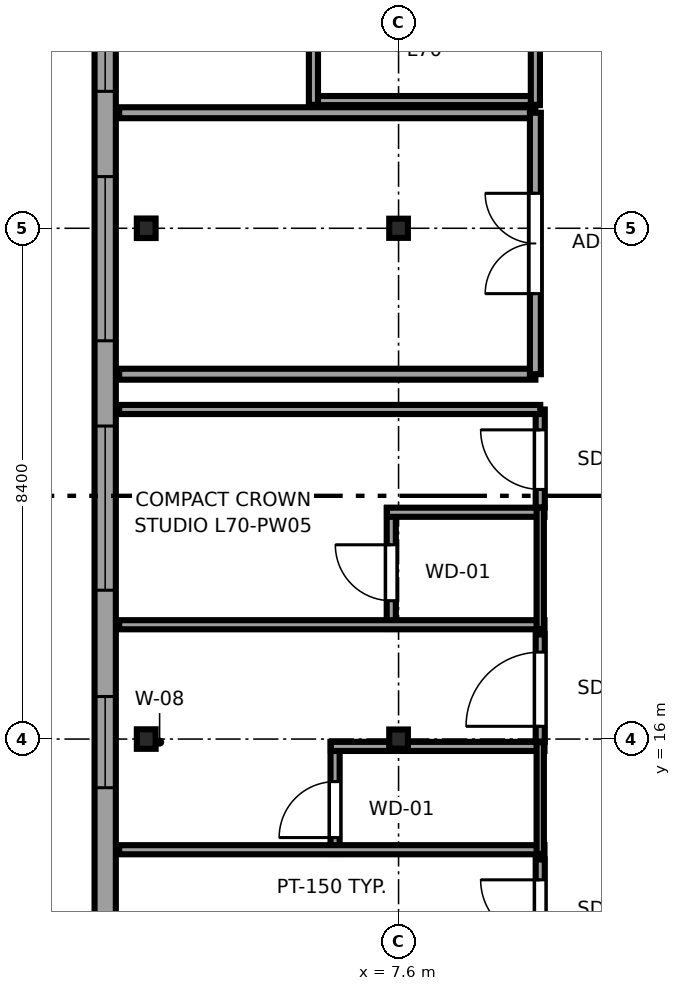
"""IFC4 building model, lengths in metres.
Left out: names, types, materials, properties, quantities, classifications, styles, units other than length and angle.
Written with IfcOpenShell. Run it as: python <this file> out.ifc"""

import sys

from ifc_helpers import new_model, si_unit, direction, frame, frame_2d, origin, origin_2d, place, context, subcontext, project, spatial, rectangle, i_section, extrude, source, transform, mapped, element, fill, save


model = new_model("IFC4")
c1 = context("Model", 3, precision=1e-05, world=origin(), true_north=direction((0.0, 1.0)))
c2 = subcontext(c1, "Body", "Model", "MODEL_VIEW")
j1 = project(units=[si_unit("LENGTHUNIT", "METRE"), si_unit("PLANEANGLEUNIT", "RADIAN")], contexts=[c1])
p1 = place(None, origin())
s1 = spatial("IfcSite", under=j1, at=p1, CompositionType="ELEMENT")
p2 = place(p1, origin())
s2 = spatial("IfcBuilding", under=s1, at=p2, CompositionType="ELEMENT")
p3 = place(p2, frame((0.0, 0.0, 262.95)))
s3 = spatial("IfcBuildingStorey", under=s2, at=p3, CompositionType="ELEMENT", Elevation=262.95)
m1 = source(origin(), c2, "Body", "SweptSolid", [
    extrude(i_section(OverallWidth=0.309, OverallDepth=0.321, WebThickness=0.014, FlangeThickness=0.022, FilletRadius=0.017, at=origin_2d()), origin(), (0.0, 0.0, 1.0), 3.55),
])
p4 = place(p3, frame((3.45, 16.0, 0.0), z_axis=(0.0, 0.0, 1.0), x_axis=(1.0, 0.0, 0.0)))
e1 = element("IfcColumn", 1, at=p4, inside=s3, PredefinedType="COLUMN", context=c2, shape_type="MappedRepresentation", body=[
    mapped(m1, transform((0.0, 0.0, 0.0), x_axis=(1.0, 0.0, 0.0), y_axis=(0.0, 1.0, 0.0), z_axis=(0.0, 0.0, 1.0), scale=1.0)),
])
m2 = source(origin(), c2, "Body", "SweptSolid", [
    extrude(i_section(OverallWidth=0.307, OverallDepth=0.315, WebThickness=0.012, FlangeThickness=0.019, FilletRadius=0.017, at=origin_2d()), origin(), (0.0, 0.0, 1.0), 3.55),
])
p5 = place(p3, frame((7.6, 16.0, 0.0), z_axis=(0.0, 0.0, 1.0), x_axis=(1.0, 0.0, 0.0)))
e2 = element("IfcColumn", 2, at=p5, inside=s3, PredefinedType="COLUMN", context=c2, shape_type="MappedRepresentation", body=[
    mapped(m2, transform((0.0, 0.0, 0.0), x_axis=(1.0, 0.0, 0.0), y_axis=(0.0, 1.0, 0.0), z_axis=(0.0, 0.0, 1.0), scale=1.0)),
])
p6 = place(p3, frame((3.45, 24.4, 0.0), z_axis=(0.0, 0.0, 1.0), x_axis=(1.0, 0.0, 0.0)))
e3 = element("IfcColumn", 3, at=p6, inside=s3, PredefinedType="COLUMN", context=c2, shape_type="MappedRepresentation", body=[
    mapped(m1, transform((0.0, 0.0, 0.0), x_axis=(1.0, 0.0, 0.0), y_axis=(0.0, 1.0, 0.0), z_axis=(0.0, 0.0, 1.0), scale=1.0)),
])
p7 = place(p3, frame((7.6, 24.4, 0.0), z_axis=(0.0, 0.0, 1.0), x_axis=(1.0, 0.0, 0.0)))
e4 = element("IfcColumn", 4, at=p7, inside=s3, PredefinedType="COLUMN", context=c2, shape_type="MappedRepresentation", body=[
    mapped(m2, transform((0.0, 0.0, 0.0), x_axis=(1.0, 0.0, 0.0), y_axis=(0.0, 1.0, 0.0), z_axis=(0.0, 0.0, 1.0), scale=1.0)),
])
p8 = place(p3, frame((2.775, 40.783, 0.0), z_axis=(0.0, 0.0, 1.0), x_axis=(0.0, -1.0, 0.0)))
e5 = element("IfcWall", 5, at=p8, inside=s3, PredefinedType="SOLIDWALL", context=c2, shape_type="SweptSolid", body=[
    extrude(rectangle(XDim=33.766, YDim=0.35, at=frame_2d((16.883, 0.0))), origin(), (0.0, 0.0, 1.0), 3.37),
])
p9 = place(p8, frame((5.678, 0.0, 0.68)))
e6 = element("IfcOpeningElement", 6, at=p9, cuts=e5, PredefinedType="OPENING", context=c2, shape_type="SweptSolid", body=[
    extrude(rectangle(XDim=2.7, YDim=1.95, at=frame_2d((1.35, 0.975))), frame((0.0, 0.185, 0.0), z_axis=(0.0, -1.0, 0.0), x_axis=(1.0, 0.0, 0.0)), (0.0, 0.0, 1.0), 0.37),
])
p10 = place(p8, frame((11.431, 0.0, 0.68)))
e7 = element("IfcOpeningElement", 7, at=p10, cuts=e5, PredefinedType="OPENING", context=c2, shape_type="SweptSolid", body=[
    extrude(rectangle(XDim=2.7, YDim=1.95, at=frame_2d((1.35, 0.975))), frame((0.0, 0.185, 0.0), z_axis=(0.0, -1.0, 0.0), x_axis=(1.0, 0.0, 0.0)), (0.0, 0.0, 1.0), 0.37),
])
p11 = place(p8, frame((15.533, 0.0, 0.68)))
e8 = element("IfcOpeningElement", 8, at=p11, cuts=e5, PredefinedType="OPENING", context=c2, shape_type="SweptSolid", body=[
    extrude(rectangle(XDim=2.7, YDim=1.95, at=frame_2d((1.35, 0.975))), frame((0.0, 0.185, 0.0), z_axis=(0.0, -1.0, 0.0), x_axis=(1.0, 0.0, 0.0)), (0.0, 0.0, 1.0), 0.37),
])
p12 = place(p8, frame((19.635, 0.0, 0.68)))
e9 = element("IfcOpeningElement", 9, at=p12, cuts=e5, PredefinedType="OPENING", context=c2, shape_type="SweptSolid", body=[
    extrude(rectangle(XDim=2.7, YDim=1.95, at=frame_2d((1.35, 0.975))), frame((0.0, 0.185, 0.0), z_axis=(0.0, -1.0, 0.0), x_axis=(1.0, 0.0, 0.0)), (0.0, 0.0, 1.0), 0.37),
])
p13 = place(p8, frame((31.279, 0.0, 0.62)))
e10 = element("IfcOpeningElement", 10, at=p13, cuts=e5, PredefinedType="OPENING", context=c2, shape_type="SweptSolid", body=[
    extrude(rectangle(XDim=1.5, YDim=1.55, at=frame_2d((0.75, 0.775))), frame((0.0, 0.185, 0.0), z_axis=(0.0, -1.0, 0.0), x_axis=(1.0, 0.0, 0.0)), (0.0, 0.0, 1.0), 0.37),
])
p14 = place(p8, frame((27.783, 0.0, 0.62)))
e11 = element("IfcOpeningElement", 11, at=p14, cuts=e5, PredefinedType="OPENING", context=c2, shape_type="SweptSolid", body=[
    extrude(rectangle(XDim=1.5, YDim=1.55, at=frame_2d((0.75, 0.775))), frame((0.0, 0.185, 0.0), z_axis=(0.0, -1.0, 0.0), x_axis=(1.0, 0.0, 0.0)), (0.0, 0.0, 1.0), 0.37),
])
p15 = place(p8, frame((24.083, 0.0, 0.62)))
e12 = element("IfcOpeningElement", 12, at=p15, cuts=e5, PredefinedType="OPENING", context=c2, shape_type="SweptSolid", body=[
    extrude(rectangle(XDim=1.5, YDim=1.55, at=frame_2d((0.75, 0.775))), frame((0.0, 0.185, 0.0), z_axis=(0.0, -1.0, 0.0), x_axis=(1.0, 0.0, 0.0)), (0.0, 0.0, 1.0), 0.37),
])
p16 = place(p8, frame((0.586, 0.0, 0.62)))
e13 = element("IfcOpeningElement", 13, at=p16, cuts=e5, PredefinedType="OPENING", context=c2, shape_type="SweptSolid", body=[
    extrude(rectangle(XDim=1.5, YDim=1.55, at=frame_2d((0.75, 0.775))), frame((0.0, 0.185, 0.0), z_axis=(0.0, -1.0, 0.0), x_axis=(1.0, 0.0, 0.0)), (0.0, 0.0, 1.0), 0.37),
])
p17 = place(p3, frame((6.556, 14.11, 0.0), z_axis=(0.0, 0.0, 1.0), x_axis=(0.0, 1.0, 0.0)))
e14 = element("IfcWall", 14, at=p17, inside=s3, PredefinedType="PARTITIONING", context=c2, shape_type="SweptSolid", body=[
    extrude(rectangle(XDim=1.839, YDim=0.15, at=frame_2d((0.919, 0.0))), origin(), (0.0, 0.0, 1.0), 3.37),
])
p18 = place(p17, frame((0.27, 0.0, 0.0)))
e15 = element("IfcOpeningElement", 15, at=p18, cuts=e14, PredefinedType="OPENING", context=c2, shape_type="SweptSolid", body=[
    extrude(rectangle(XDim=0.92, YDim=2.01, at=frame_2d((0.46, 1.005))), frame((0.0, 0.085, 0.0), z_axis=(0.0, -1.0, 0.0), x_axis=(1.0, 0.0, 0.0)), (0.0, 0.0, 1.0), 0.17),
])
p19 = place(p3, frame((3.005, 14.18, 0.0), z_axis=(0.0, 0.0, 1.0), x_axis=(1.0, 0.0, 0.0)))
e16 = element("IfcWall", 16, at=p19, inside=s3, PredefinedType="PARTITIONING", context=c2, shape_type="SweptSolid", body=[
    extrude(rectangle(XDim=6.995, YDim=0.15, at=frame_2d((3.498, 0.0))), origin(), (0.0, 0.0, 1.0), 3.37),
])
p20 = place(p3, frame((6.486, 15.879, 0.0), z_axis=(0.0, 0.0, 1.0), x_axis=(1.0, 0.0, 0.0)))
e17 = element("IfcWall", 17, at=p20, inside=s3, PredefinedType="PARTITIONING", context=c2, shape_type="SweptSolid", body=[
    extrude(rectangle(XDim=3.514, YDim=0.15, at=frame_2d((1.757, 0.0))), origin(), (0.0, 0.0, 1.0), 2.827),
])
p21 = place(p3, frame((9.93, 14.11, 0.0), z_axis=(0.0, 0.0, 1.0), x_axis=(0.0, 1.0, 0.0)))
e18 = element("IfcWall", 18, at=p21, inside=s3, PredefinedType="PLUMBINGWALL", context=c2, shape_type="SweptSolid", body=[
    extrude(rectangle(XDim=1.839, YDim=0.12, at=frame_2d((0.919, 0.0))), origin(), (0.0, 0.0, 1.0), 3.37),
])
p22 = place(p3, frame((7.48, 17.81, 0.0), z_axis=(0.0, 0.0, 1.0), x_axis=(0.0, 1.0, 0.0)))
e19 = element("IfcWall", 19, at=p22, inside=s3, PredefinedType="PARTITIONING", context=c2, shape_type="SweptSolid", body=[
    extrude(rectangle(XDim=1.99, YDim=0.15, at=frame_2d((0.995, 0.0))), origin(), (0.0, 0.0, 1.0), 2.827),
])
p23 = place(p22, frame((0.465, 0.0, 0.0)))
e20 = element("IfcOpeningElement", 20, at=p23, cuts=e19, PredefinedType="OPENING", context=c2, shape_type="SweptSolid", body=[
    extrude(rectangle(XDim=0.92, YDim=2.01, at=frame_2d((0.46, 1.005))), frame((0.0, 0.085, 0.0), z_axis=(0.0, -1.0, 0.0), x_axis=(1.0, 0.0, 0.0)), (0.0, 0.0, 1.0), 0.17),
])
p24 = place(p3, frame((3.005, 17.88, 0.0), z_axis=(0.0, 0.0, 1.0), x_axis=(1.0, 0.0, 0.0)))
e21 = element("IfcWall", 21, at=p24, inside=s3, PredefinedType="PARTITIONING", context=c2, shape_type="SweptSolid", body=[
    extrude(rectangle(XDim=6.995, YDim=0.15, at=frame_2d((3.498, 0.0))), origin(), (0.0, 0.0, 1.0), 3.37),
])
p25 = place(p3, frame((7.41, 19.73, 0.0), z_axis=(0.0, 0.0, 1.0), x_axis=(1.0, 0.0, 0.0)))
e22 = element("IfcWall", 22, at=p25, inside=s3, PredefinedType="PARTITIONING", context=c2, shape_type="SweptSolid", body=[
    extrude(rectangle(XDim=2.59, YDim=0.15, at=frame_2d((1.295, 0.0))), origin(), (0.0, 0.0, 1.0), 3.37),
])
p26 = place(p3, frame((9.93, 17.81, 0.0), z_axis=(0.0, 0.0, 1.0), x_axis=(0.0, 1.0, 0.0)))
e23 = element("IfcWall", 23, at=p26, inside=s3, PredefinedType="PLUMBINGWALL", context=c2, shape_type="SweptSolid", body=[
    extrude(rectangle(XDim=1.99, YDim=0.12, at=frame_2d((0.995, 0.0))), origin(), (0.0, 0.0, 1.0), 3.37),
])
p27 = place(p3, frame((9.93, 12.41, 0.0), z_axis=(0.0, 0.0, 1.0), x_axis=(0.0, 1.0, 0.0)))
e24 = element("IfcWall", 24, at=p27, inside=s3, PredefinedType="PARTITIONING", context=c2, shape_type="SweptSolid", body=[
    extrude(rectangle(XDim=1.61, YDim=0.15, at=frame_2d((0.805, 0.0))), origin(), (0.0, 0.0, 1.0), 3.37),
])
p28 = place(p27, frame((0.295, 0.0, 0.0)))
e25 = element("IfcOpeningElement", 25, at=p28, cuts=e24, PredefinedType="OPENING", context=c2, shape_type="SweptSolid", body=[
    extrude(rectangle(XDim=0.98, YDim=2.12, at=frame_2d((0.49, 1.06))), frame((0.0, 0.085, 0.0), z_axis=(0.0, -1.0, 0.0), x_axis=(1.0, 0.0, 0.0)), (0.0, 0.0, 1.0), 0.17),
])
p29 = place(p3, frame((9.93, 15.959, 0.0), z_axis=(0.0, 0.0, 1.0), x_axis=(0.0, 1.0, 0.0)))
e26 = element("IfcWall", 26, at=p29, inside=s3, PredefinedType="PARTITIONING", context=c2, shape_type="SweptSolid", body=[
    extrude(rectangle(XDim=1.761, YDim=0.15, at=frame_2d((0.88, 0.0))), origin(), (0.0, 0.0, 1.0), 3.37),
])
p30 = place(p29, frame((0.25, 0.0, 0.0)))
e27 = element("IfcOpeningElement", 27, at=p30, cuts=e26, PredefinedType="OPENING", context=c2, shape_type="SweptSolid", body=[
    extrude(rectangle(XDim=1.22, YDim=2.08, at=frame_2d((0.61, 1.04))), frame((0.0, 0.085, 0.0), z_axis=(0.0, -1.0, 0.0), x_axis=(1.0, 0.0, 0.0)), (0.0, 0.0, 1.0), 0.17),
])
p31 = place(p3, frame((9.93, 19.81, 0.0), z_axis=(0.0, 0.0, 1.0), x_axis=(0.0, 1.0, 0.0)))
e28 = element("IfcWall", 28, at=p31, inside=s3, PredefinedType="PARTITIONING", context=c2, shape_type="SweptSolid", body=[
    extrude(rectangle(XDim=1.61, YDim=0.15, at=frame_2d((0.805, 0.0))), origin(), (0.0, 0.0, 1.0), 3.37),
])
p32 = place(p31, frame((0.295, 0.0, 0.0)))
e29 = element("IfcOpeningElement", 29, at=p32, cuts=e28, PredefinedType="OPENING", context=c2, shape_type="SweptSolid", body=[
    extrude(rectangle(XDim=0.98, YDim=2.12, at=frame_2d((0.49, 1.06))), frame((0.0, 0.085, 0.0), z_axis=(0.0, -1.0, 0.0), x_axis=(1.0, 0.0, 0.0)), (0.0, 0.0, 1.0), 0.17),
])
p33 = place(p3, frame((3.005, 21.42, 0.0), z_axis=(0.0, 0.0, 1.0), x_axis=(1.0, 0.0, 0.0)))
e30 = element("IfcWall", 30, at=p33, inside=s3, PredefinedType="PARTITIONING", context=c2, shape_type="SweptSolid", body=[
    extrude(rectangle(XDim=6.925, YDim=0.15, at=frame_2d((3.462, 0.0))), origin(), (0.0, 0.0, 1.0), 3.37),
])
for number, where, z_axis, x_axis in (
    (31, (3.005, 22.0, 0.0), (0.0, 0.0, 1.0), (1.0, 0.0, 0.0)),
    (32, (3.005, 26.3, 0.0), (0.0, 0.0, 1.0), (1.0, 0.0, 0.0)),
):
    element("IfcWall", number, at=place(p3, frame(where, z_axis=z_axis, x_axis=x_axis)), inside=s3, PredefinedType="PARTITIONING", context=c2, shape_type="SweptSolid", body=[
        extrude(rectangle(XDim=6.845, YDim=0.18, at=frame_2d((3.423, 0.0))), origin(), (0.0, 0.0, 1.0), 3.37),
    ])
p34 = place(p3, frame((9.85, 22.0, 0.0), z_axis=(0.0, 0.0, 1.0), x_axis=(0.0, 1.0, 0.0)))
e33 = element("IfcWall", 33, at=p34, inside=s3, PredefinedType="PARTITIONING", context=c2, shape_type="SweptSolid", body=[
    extrude(rectangle(XDim=4.3, YDim=0.18, at=frame_2d((2.15, 0.0))), origin(), (0.0, 0.0, 1.0), 3.37),
])
p35 = place(p34, frame((1.325, 0.0, 0.0)))
e34 = element("IfcOpeningElement", 34, at=p35, cuts=e33, PredefinedType="OPENING", context=c2, shape_type="SweptSolid", body=[
    extrude(rectangle(XDim=1.65, YDim=2.15, at=frame_2d((0.825, 1.075))), frame((0.0, 0.1, 0.0), z_axis=(0.0, -1.0, 0.0), x_axis=(1.0, 0.0, 0.0)), (0.0, 0.0, 1.0), 0.2),
])
p36 = place(p3, frame((6.13, 26.5, 0.0), z_axis=(0.0, 0.0, 1.0), x_axis=(1.0, 0.0, 0.0)))
e35 = element("IfcWall", 35, at=p36, inside=s3, PredefinedType="PARTITIONING", context=c2, shape_type="SweptSolid", body=[
    extrude(rectangle(XDim=3.79, YDim=0.15, at=frame_2d((1.895, 0.0))), origin(), (0.0, 0.0, 1.0), 3.37),
])
for number, where, z_axis, x_axis in (
    (36, (6.2, 26.43, 0.0), (0.0, 0.0, 1.0), (0.0, 1.0, 0.0)),
    (37, (9.85, 26.43, 0.0), (0.0, 0.0, 1.0), (0.0, 1.0, 0.0)),
):
    element("IfcWall", number, at=place(p3, frame(where, z_axis=z_axis, x_axis=x_axis)), inside=s3, PredefinedType="PARTITIONING", context=c2, shape_type="SweptSolid", body=[
        extrude(rectangle(XDim=3.34, YDim=0.15, at=frame_2d((1.67, 0.0))), origin(), (0.0, 0.0, 1.0), 3.37),
    ])
m3 = source(origin(), c2, "Body", "SweptSolid", [
    extrude(rectangle(XDim=2.7, YDim=1.95, at=frame_2d((1.35, 0.975))), frame((0.0, 0.09, 0.0), z_axis=(0.0, -1.0, 0.0), x_axis=(1.0, 0.0, 0.0)), (0.0, 0.0, 1.0), 0.06),
])
p37 = place(p10, origin())
e38 = element("IfcWindow", 38, at=p37, inside=s3, PartitioningType="TRIPLE_PANEL_HORIZONTAL", PredefinedType="WINDOW", context=c2, shape_type="MappedRepresentation", body=[
    mapped(m3, transform((0.0, 0.0, 0.0), x_axis=(1.0, 0.0, 0.0), y_axis=(0.0, 1.0, 0.0), z_axis=(0.0, 0.0, 1.0), scale=1.0)),
])
fill(e7, e38)
p38 = place(p11, origin())
e39 = element("IfcWindow", 39, at=p38, inside=s3, PartitioningType="TRIPLE_PANEL_HORIZONTAL", PredefinedType="WINDOW", context=c2, shape_type="MappedRepresentation", body=[
    mapped(m3, transform((0.0, 0.0, 0.0), x_axis=(1.0, 0.0, 0.0), y_axis=(0.0, 1.0, 0.0), z_axis=(0.0, 0.0, 1.0), scale=1.0)),
])
fill(e8, e39)
p39 = place(p12, origin())
e40 = element("IfcWindow", 40, at=p39, inside=s3, PartitioningType="TRIPLE_PANEL_HORIZONTAL", PredefinedType="WINDOW", context=c2, shape_type="MappedRepresentation", body=[
    mapped(m3, transform((0.0, 0.0, 0.0), x_axis=(1.0, 0.0, 0.0), y_axis=(0.0, 1.0, 0.0), z_axis=(0.0, 0.0, 1.0), scale=1.0)),
])
fill(e9, e40)
m4 = source(origin(), c2, "Body", "SweptSolid", [
    extrude(rectangle(XDim=1.5, YDim=1.55, at=frame_2d((0.75, 0.775))), frame((0.0, 0.09, 0.0), z_axis=(0.0, -1.0, 0.0), x_axis=(1.0, 0.0, 0.0)), (0.0, 0.0, 1.0), 0.06),
])
p40 = place(p15, origin())
e41 = element("IfcWindow", 41, at=p40, inside=s3, PartitioningType="SINGLE_PANEL", PredefinedType="WINDOW", context=c2, shape_type="MappedRepresentation", body=[
    mapped(m4, transform((0.0, 0.0, 0.0), x_axis=(1.0, 0.0, 0.0), y_axis=(0.0, 1.0, 0.0), z_axis=(0.0, 0.0, 1.0), scale=1.0)),
])
fill(e12, e41)
m5 = source(origin(), c2, "Body", "SweptSolid", [
    extrude(rectangle(XDim=0.92, YDim=2.01, at=frame_2d((0.46, 1.005))), frame((0.0, 0.025, 0.0), z_axis=(0.0, -1.0, 0.0), x_axis=(1.0, 0.0, 0.0)), (0.0, 0.0, 1.0), 0.05),
])
p41 = place(p18, origin())
e42 = element("IfcDoor", 42, at=p41, inside=s3, OperationType="SINGLE_SWING_LEFT", PredefinedType="DOOR", context=c2, shape_type="MappedRepresentation", body=[
    mapped(m5, transform((0.0, 0.0, 0.0), x_axis=(1.0, 0.0, 0.0), y_axis=(0.0, 1.0, 0.0), z_axis=(0.0, 0.0, 1.0), scale=1.0)),
])
fill(e15, e42)
p42 = place(p23, origin())
e43 = element("IfcDoor", 43, at=p42, inside=s3, OperationType="SINGLE_SWING_RIGHT", PredefinedType="DOOR", context=c2, shape_type="MappedRepresentation", body=[
    mapped(m5, transform((0.0, 0.0, 0.0), x_axis=(1.0, 0.0, 0.0), y_axis=(0.0, 1.0, 0.0), z_axis=(0.0, 0.0, 1.0), scale=1.0)),
])
fill(e20, e43)
m6 = source(origin(), c2, "Body", "SweptSolid", [
    extrude(rectangle(XDim=0.98, YDim=2.12, at=frame_2d((0.49, 1.06))), frame((0.0, 0.025, 0.0), z_axis=(0.0, -1.0, 0.0), x_axis=(1.0, 0.0, 0.0)), (0.0, 0.0, 1.0), 0.05),
])
p43 = place(p28, origin())
e44 = element("IfcDoor", 44, at=p43, inside=s3, OperationType="SINGLE_SWING_RIGHT", PredefinedType="DOOR", context=c2, shape_type="MappedRepresentation", body=[
    mapped(m6, transform((0.0, 0.0, 0.0), x_axis=(1.0, 0.0, 0.0), y_axis=(0.0, 1.0, 0.0), z_axis=(0.0, 0.0, 1.0), scale=1.0)),
])
fill(e25, e44)
m7 = source(origin(), c2, "Body", "SweptSolid", [
    extrude(rectangle(XDim=1.22, YDim=2.08, at=frame_2d((0.61, 1.04))), frame((0.0, 0.025, 0.0), z_axis=(0.0, -1.0, 0.0), x_axis=(1.0, 0.0, 0.0)), (0.0, 0.0, 1.0), 0.05),
])
p44 = place(p30, origin())
e45 = element("IfcDoor", 45, at=p44, inside=s3, OperationType="SINGLE_SWING_LEFT", PredefinedType="DOOR", context=c2, shape_type="MappedRepresentation", body=[
    mapped(m7, transform((0.0, 0.0, 0.0), x_axis=(1.0, 0.0, 0.0), y_axis=(0.0, 1.0, 0.0), z_axis=(0.0, 0.0, 1.0), scale=1.0)),
])
fill(e27, e45)
p45 = place(p32, origin())
e46 = element("IfcDoor", 46, at=p45, inside=s3, OperationType="SINGLE_SWING_RIGHT", PredefinedType="DOOR", context=c2, shape_type="MappedRepresentation", body=[
    mapped(m6, transform((0.0, 0.0, 0.0), x_axis=(1.0, 0.0, 0.0), y_axis=(0.0, 1.0, 0.0), z_axis=(0.0, 0.0, 1.0), scale=1.0)),
])
fill(e29, e46)
m8 = source(origin(), c2, "Body", "SweptSolid", [
    extrude(rectangle(XDim=1.65, YDim=2.15, at=frame_2d((0.825, 1.075))), frame((0.0, 0.025, 0.0), z_axis=(0.0, -1.0, 0.0), x_axis=(1.0, 0.0, 0.0)), (0.0, 0.0, 1.0), 0.05),
])
p46 = place(p35, origin())
e47 = element("IfcDoor", 47, at=p46, inside=s3, OperationType="DOUBLE_DOOR_SINGLE_SWING", PredefinedType="DOOR", context=c2, shape_type="MappedRepresentation", body=[
    mapped(m8, transform((0.0, 0.0, 0.0), x_axis=(1.0, 0.0, 0.0), y_axis=(0.0, 1.0, 0.0), z_axis=(0.0, 0.0, 1.0), scale=1.0)),
])
fill(e34, e47)
save(model, sys.argv[1])
